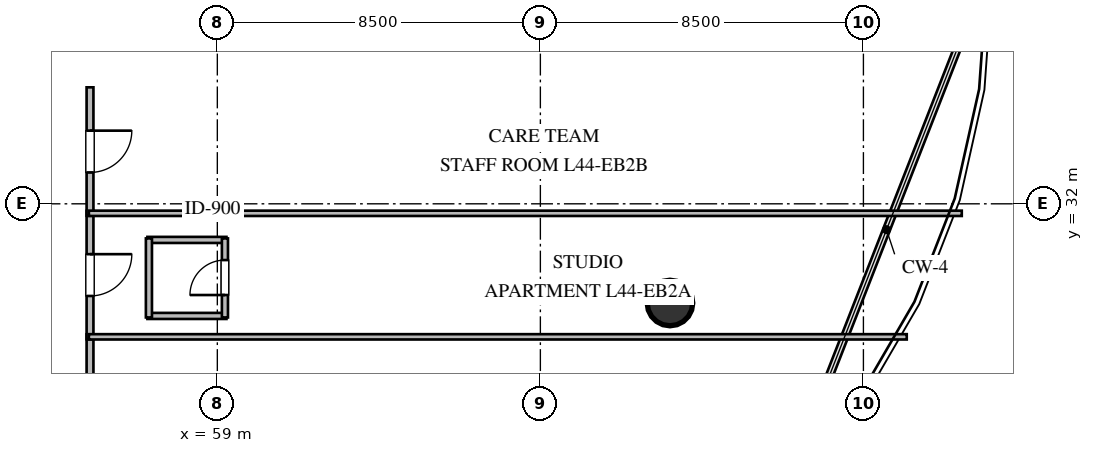
"""IFC4 building model, lengths in metres.
Left out: names, types, materials, properties, quantities, classifications, styles, units other than length and angle.
Written with IfcOpenShell. Run it as: python <this file> out.ifc"""

import sys

from ifc_helpers import new_model, si_unit, direction, frame, frame_2d, origin, origin_2d, place, context, subcontext, project, spatial, rectangle, circle, extrude, element, fill, save


model = new_model("IFC4")
c1 = context("Model", 3, precision=1e-05, world=origin(), true_north=direction((0.0, 1.0)))
c2 = subcontext(c1, "Body", "Model", "MODEL_VIEW")
j1 = project(units=[si_unit("LENGTHUNIT", "METRE"), si_unit("PLANEANGLEUNIT", "RADIAN")], contexts=[c1])
p1 = place(None, origin())
s1 = spatial("IfcSite", under=j1, at=p1, CompositionType="ELEMENT")
p2 = place(p1, origin())
s2 = spatial("IfcBuilding", under=s1, at=p2, CompositionType="ELEMENT")
p3 = place(p2, frame((0.0, 0.0, 167.4)))
s3 = spatial("IfcBuildingStorey", under=s2, at=p3, CompositionType="ELEMENT", Elevation=167.4)
p4 = place(p3, frame((70.91, 29.39, 0.0), z_axis=(0.0, 0.0, 1.0), x_axis=(1.0, 0.0, 0.0)))
e1 = element("IfcColumn", 1, at=p4, inside=s3, PredefinedType="COLUMN", context=c2, shape_type="SweptSolid", body=[
    extrude(circle(Radius=0.6, at=origin_2d()), origin(), (0.0, 0.0, 1.0), 3.6),
])
for number, where, z_axis, x_axis in (
    (2, (57.16, 29.05, 0.0), (0.0, 0.0, 1.0), (1.0, 0.0, 0.0)),
    (3, (57.16, 31.05, 0.0), (0.0, 0.0, 1.0), (1.0, 0.0, 0.0)),
    (4, (57.2, 29.01, 0.0), (0.0, 0.0, 1.0), (0.0, 1.0, 0.0)),
):
    element("IfcWall", number, at=place(p3, frame(where, z_axis=z_axis, x_axis=x_axis)), inside=s3, PredefinedType="PLUMBINGWALL", context=c2, shape_type="SweptSolid", body=[
        extrude(rectangle(XDim=2.08, YDim=0.16, at=frame_2d((1.04, 0.0))), origin(), (0.0, 0.0, 1.0), 3.36),
    ])
p5 = place(p3, frame((59.2, 29.01, 0.0), z_axis=(0.0, 0.0, 1.0), x_axis=(0.0, 1.0, 0.0)))
e5 = element("IfcWall", 5, at=p5, inside=s3, PredefinedType="PLUMBINGWALL", context=c2, shape_type="SweptSolid", body=[
    extrude(rectangle(XDim=2.08, YDim=0.16, at=frame_2d((1.04, 0.0))), origin(), (0.0, 0.0, 1.0), 2.996),
])
p6 = place(p5, frame((0.59, 0.0, 0.0)))
e6 = element("IfcOpeningElement", 6, at=p6, cuts=e5, PredefinedType="OPENING", context=c2, shape_type="SweptSolid", body=[
    extrude(rectangle(XDim=0.92, YDim=2.1, at=frame_2d((0.46, 1.05))), frame((0.0, 0.09, 0.0), z_axis=(0.0, -1.0, 0.0), x_axis=(1.0, 0.0, 0.0)), (0.0, 0.0, 1.0), 0.18),
])
p7 = place(p3, frame((55.65, 28.565, 0.0), z_axis=(0.0, 0.0, 1.0), x_axis=(0.0, -1.0, 0.0)))
e7 = element("IfcWall", 7, at=p7, inside=s3, PredefinedType="PARTITIONING", context=c2, shape_type="SweptSolid", body=[
    extrude(rectangle(XDim=3.79, YDim=0.18, at=frame_2d((1.895, 0.0))), origin(), (0.0, 0.0, 1.0), 3.36),
])
p8 = place(p7, frame((1.345, 0.0, 0.0)))
e8 = element("IfcOpeningElement", 8, at=p8, cuts=e7, PredefinedType="OPENING", context=c2, shape_type="SweptSolid", body=[
    extrude(rectangle(XDim=1.1, YDim=2.1, at=frame_2d((0.55, 1.05))), frame((0.0, 0.1, 0.0), z_axis=(0.0, -1.0, 0.0), x_axis=(1.0, 0.0, 0.0)), (0.0, 0.0, 1.0), 0.2),
])
p9 = place(p3, frame((55.65, 31.815, 0.0), z_axis=(0.0, 0.0, 1.0), x_axis=(0.0, -1.0, 0.0)))
e9 = element("IfcWall", 9, at=p9, inside=s3, PredefinedType="PARTITIONING", context=c2, shape_type="SweptSolid", body=[
    extrude(rectangle(XDim=3.38, YDim=0.18, at=frame_2d((1.69, 0.0))), origin(), (0.0, 0.0, 1.0), 3.36),
])
p10 = place(p9, frame((1.14, 0.0, 0.0)))
e10 = element("IfcOpeningElement", 10, at=p10, cuts=e9, PredefinedType="OPENING", context=c2, shape_type="SweptSolid", body=[
    extrude(rectangle(XDim=1.1, YDim=2.1, at=frame_2d((0.55, 1.05))), frame((0.0, 0.1, 0.0), z_axis=(0.0, -1.0, 0.0), x_axis=(1.0, 0.0, 0.0)), (0.0, 0.0, 1.0), 0.2),
])
p11 = place(p3, frame((55.65, 35.065, 0.0), z_axis=(0.0, 0.0, 1.0), x_axis=(0.0, -1.0, 0.0)))
e11 = element("IfcWall", 11, at=p11, inside=s3, PredefinedType="PARTITIONING", context=c2, shape_type="SweptSolid", body=[
    extrude(rectangle(XDim=3.38, YDim=0.18, at=frame_2d((1.69, 0.0))), origin(), (0.0, 0.0, 1.0), 3.36),
])
p12 = place(p11, frame((1.14, 0.0, 0.0)))
e12 = element("IfcOpeningElement", 12, at=p12, cuts=e11, PredefinedType="OPENING", context=c2, shape_type="SweptSolid", body=[
    extrude(rectangle(XDim=1.1, YDim=2.1, at=frame_2d((0.55, 1.05))), frame((0.0, 0.1, 0.0), z_axis=(0.0, -1.0, 0.0), x_axis=(1.0, 0.0, 0.0)), (0.0, 0.0, 1.0), 0.2),
])
p13 = place(p3, frame((55.62, 28.5, 0.0), z_axis=(0.0, 0.0, 1.0), x_axis=(1.0, 0.0, 0.0)))
e13 = element("IfcWall", 13, at=p13, inside=s3, PredefinedType="PARTITIONING", context=c2, shape_type="SweptSolid", body=[
    extrude(rectangle(XDim=21.52, YDim=0.14, at=frame_2d((10.76, 0.0))), origin(), (0.0, 0.0, 1.0), 2.806),
])
p14 = place(p3, frame((55.62, 31.75, 0.0), z_axis=(0.0, 0.0, 1.0), x_axis=(1.0, 0.0, 0.0)))
e14 = element("IfcWall", 14, at=p14, inside=s3, PredefinedType="PARTITIONING", context=c2, shape_type="SweptSolid", body=[
    extrude(rectangle(XDim=22.968, YDim=0.14, at=frame_2d((11.484, 0.0))), origin(), (0.0, 0.0, 1.0), 3.36),
])
p15 = place(p6, origin())
e15 = element("IfcDoor", 15, at=p15, inside=s3, OperationType="SINGLE_SWING_LEFT", PredefinedType="DOOR", context=c2, shape_type="SweptSolid", body=[
    extrude(rectangle(XDim=0.92, YDim=2.1, at=frame_2d((0.46, 1.05))), frame((0.0, 0.025, 0.0), z_axis=(0.0, -1.0, 0.0), x_axis=(1.0, 0.0, 0.0)), (0.0, 0.0, 1.0), 0.05),
])
fill(e6, e15)
p16 = place(p10, origin())
e16 = element("IfcDoor", 16, at=p16, inside=s3, OperationType="SINGLE_SWING_LEFT", PredefinedType="DOOR", context=c2, shape_type="SweptSolid", body=[
    extrude(rectangle(XDim=1.1, YDim=2.1, at=frame_2d((0.55, 1.05))), frame((0.0, 0.025, 0.0), z_axis=(0.0, -1.0, 0.0), x_axis=(1.0, 0.0, 0.0)), (0.0, 0.0, 1.0), 0.05),
])
fill(e10, e16)
p17 = place(p12, origin())
e17 = element("IfcDoor", 17, at=p17, inside=s3, OperationType="SINGLE_SWING_LEFT", PredefinedType="DOOR", context=c2, shape_type="SweptSolid", body=[
    extrude(rectangle(XDim=1.1, YDim=2.1, at=frame_2d((0.55, 1.05))), frame((0.0, 0.025, 0.0), z_axis=(0.0, -1.0, 0.0), x_axis=(1.0, 0.0, 0.0)), (0.0, 0.0, 1.0), 0.05),
])
fill(e12, e17)
save(model, sys.argv[1])
